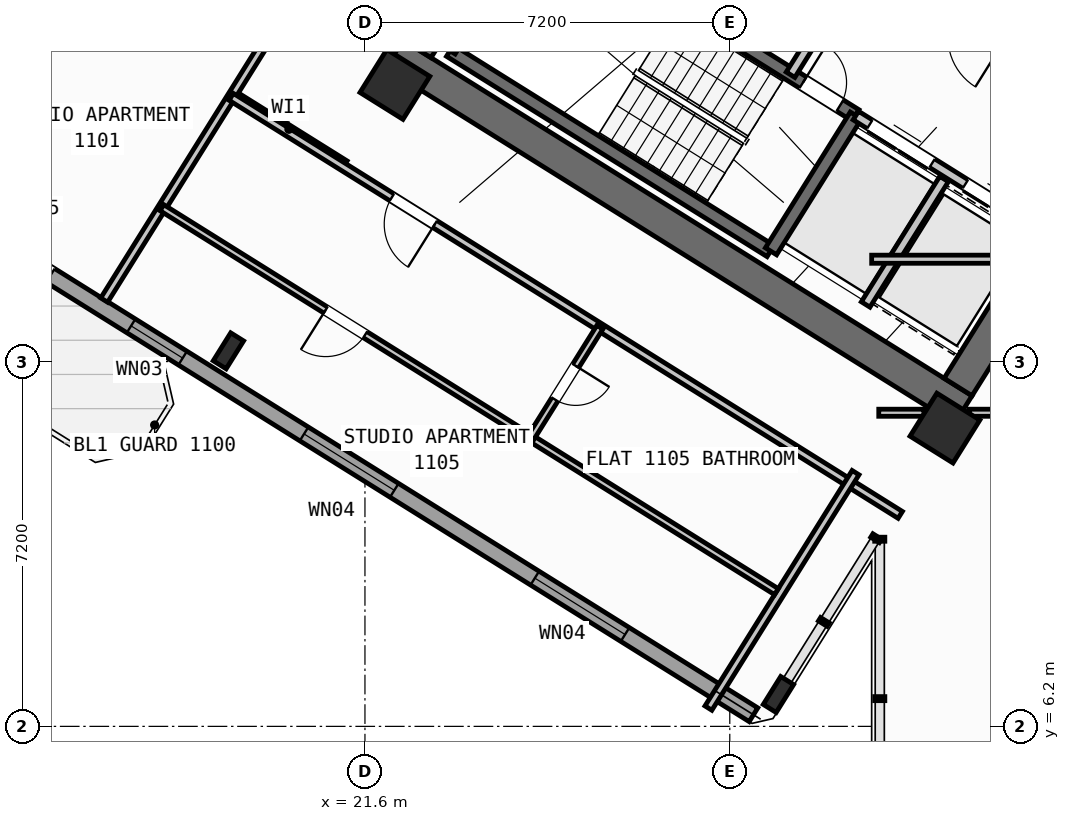
"""IFC4 building model, lengths in metres.
Left out: names, types, materials, properties, quantities, classifications, styles, units other than length and angle.
Written with IfcOpenShell. Run it as: python <this file> out.ifc"""

import sys

from ifc_helpers import new_model, si_unit, direction, frame, frame_2d, origin, origin_2d, place, context, subcontext, project, spatial, rectangle, hollow_rectangle, i_section, extrude, source, transform, mapped, element, fill, save


model = new_model("IFC4")
c1 = context("Model", 3, precision=1e-05, world=origin(), true_north=direction((0.0, 1.0)))
c2 = subcontext(c1, "Body", "Model", "MODEL_VIEW")
j1 = project(units=[si_unit("LENGTHUNIT", "METRE"), si_unit("PLANEANGLEUNIT", "RADIAN")], contexts=[c1])
p1 = place(None, origin())
s1 = spatial("IfcSite", under=j1, at=p1, CompositionType="ELEMENT")
p2 = place(p1, origin())
s2 = spatial("IfcBuilding", under=s1, at=p2, CompositionType="ELEMENT")
p3 = place(p2, frame((0.0, 0.0, 45.6)))
s3 = spatial("IfcBuildingStorey", under=s2, at=p3, CompositionType="ELEMENT", Elevation=45.6)
p4 = place(p3, frame((33.409, 12.45, 0.0), z_axis=(0.0, 0.0, 1.0), x_axis=(-0.848051132073, 0.529914405721, 0.0)))
e1 = element("IfcWall", 1, at=p4, inside=s3, PredefinedType="SHEAR", context=c2, shape_type="SweptSolid", body=[
    extrude(rectangle(XDim=13.24, YDim=0.65, at=frame_2d((6.62, 0.0))), origin(), (0.0, 0.0, 1.0), 3.35),
])
p5 = place(p3, frame((36.683, 18.304, 0.0), z_axis=(0.0, 0.0, 1.0), x_axis=(-0.529899109053, -0.848060690178, 0.0)))
e2 = element("IfcWall", 2, at=p5, inside=s3, PredefinedType="SHEAR", context=c2, shape_type="SweptSolid", body=[
    extrude(rectangle(XDim=6.375, YDim=0.65, at=frame_2d((3.188, 0.0))), origin(), (0.0, 0.0, 1.0), 3.35),
])
p6 = place(p3, frame((26.007, 24.976, 0.0), z_axis=(0.0, 0.0, 1.0), x_axis=(-0.529916319127, -0.848049936456, 0.0)))
e3 = element("IfcWall", 3, at=p6, inside=s3, PredefinedType="SHEAR", context=c2, shape_type="SweptSolid", body=[
    extrude(rectangle(XDim=6.375, YDim=0.65, at=frame_2d((3.188, 0.0))), origin(), (0.0, 0.0, 1.0), 3.35),
])
m1 = source(origin(), c2, "Body", "SweptSolid", [
    extrude(hollow_rectangle(XDim=1.0, YDim=1.0, WallThickness=0.04, at=origin_2d()), origin(), (0.0, 0.0, 1.0), 3.6),
])
p7 = place(p3, frame((33.046, 12.087, 0.0), z_axis=(0.0, 0.0, 1.0), x_axis=(-0.848048096156, 0.529919264233, 0.0)))
e4 = element("IfcColumn", 4, at=p7, inside=s3, PredefinedType="COLUMN", context=c2, shape_type="MappedRepresentation", body=[
    mapped(m1, transform((0.0, 0.0, 0.0), scale=1.0)),
])
m2 = source(origin(), c2, "Body", "SweptSolid", [
    extrude(i_section(OverallWidth=0.3, OverallDepth=0.65, WebThickness=0.016, FlangeThickness=0.031, at=origin_2d()), origin(), (0.0, 0.0, 1.0), 3.6),
])
p8 = place(p3, frame((29.761, 6.829, 0.0), z_axis=(0.0, 0.0, 1.0), x_axis=(-0.848048096156, 0.529919264233, 0.0)))
e5 = element("IfcColumn", 5, at=p8, inside=s3, PredefinedType="COLUMN", context=c2, shape_type="MappedRepresentation", body=[
    mapped(m2, transform((0.0, 0.0, 0.0), scale=1.0)),
])
p9 = place(p3, frame((22.191, 18.87, 0.0), z_axis=(0.0, 0.0, 1.0), x_axis=(-0.848048096156, 0.529919264233, 0.0)))
e6 = element("IfcColumn", 6, at=p9, inside=s3, PredefinedType="COLUMN", context=c2, shape_type="MappedRepresentation", body=[
    mapped(m1, transform((0.0, 0.0, 0.0), scale=1.0)),
])
p10 = place(p3, frame((18.906, 13.612, 0.0), z_axis=(0.0, 0.0, 1.0), x_axis=(-0.848048096156, 0.529919264233, 0.0)))
e7 = element("IfcColumn", 7, at=p10, inside=s3, PredefinedType="COLUMN", context=c2, shape_type="MappedRepresentation", body=[
    mapped(m2, transform((0.0, 0.0, 0.0), scale=1.0)),
])
p11 = place(p3, frame((29.268, 6.429, 0.0), z_axis=(0.0, 0.0, 1.0), x_axis=(-0.848049971435, 0.529916263149, 0.0)))
e8 = element("IfcWall", 8, at=p11, inside=s3, PredefinedType="STANDARD", context=c2, shape_type="SweptSolid", body=[
    extrude(rectangle(XDim=31.588, YDim=0.32, at=frame_2d((15.794, 0.0))), origin(), (0.0, 0.0, 1.0), 3.35),
])
p12 = place(p11, frame((16.362, 0.0, 0.0)))
e9 = element("IfcOpeningElement", 9, at=p12, cuts=e8, PredefinedType="OPENING", context=c2, shape_type="SweptSolid", body=[
    extrude(rectangle(XDim=1.2, YDim=2.15, at=frame_2d((0.6, 1.075))), frame((0.0, 0.17, 0.0), z_axis=(0.0, -1.0, 0.0), x_axis=(1.0, 0.0, 0.0)), (0.0, 0.0, 1.0), 0.34),
])
p13 = place(p11, frame((2.989, 0.0, 0.8)))
e10 = element("IfcOpeningElement", 10, at=p13, cuts=e8, PredefinedType="OPENING", context=c2, shape_type="SweptSolid", body=[
    extrude(rectangle(XDim=2.1, YDim=1.55, at=frame_2d((1.05, 0.775))), frame((0.0, 0.17, 0.0), z_axis=(0.0, -1.0, 0.0), x_axis=(1.0, 0.0, 0.0)), (0.0, 0.0, 1.0), 0.34),
])
p14 = place(p11, frame((8.359, 0.0, 0.8)))
e11 = element("IfcOpeningElement", 11, at=p14, cuts=e8, PredefinedType="OPENING", context=c2, shape_type="SweptSolid", body=[
    extrude(rectangle(XDim=2.1, YDim=1.55, at=frame_2d((1.05, 0.775))), frame((0.0, 0.17, 0.0), z_axis=(0.0, -1.0, 0.0), x_axis=(1.0, 0.0, 0.0)), (0.0, 0.0, 1.0), 0.34),
])
p15 = place(p11, frame((13.284, 0.0, 0.95)))
e12 = element("IfcOpeningElement", 12, at=p15, cuts=e8, PredefinedType="OPENING", context=c2, shape_type="SweptSolid", body=[
    extrude(rectangle(XDim=1.2, YDim=1.4, at=frame_2d((0.6, 0.7))), frame((0.0, 0.17, 0.0), z_axis=(0.0, -1.0, 0.0), x_axis=(1.0, 0.0, 0.0)), (0.0, 0.0, 1.0), 0.34),
])
p16 = place(p11, frame((20.259, 0.0, 0.95)))
e13 = element("IfcOpeningElement", 13, at=p16, cuts=e8, PredefinedType="OPENING", context=c2, shape_type="SweptSolid", body=[
    extrude(rectangle(XDim=1.2, YDim=1.4, at=frame_2d((0.6, 0.7))), frame((0.0, 0.17, 0.0), z_axis=(0.0, -1.0, 0.0), x_axis=(1.0, 0.0, 0.0)), (0.0, 0.0, 1.0), 0.34),
])
p17 = place(p11, frame((22.929, 0.0, 0.95)))
e14 = element("IfcOpeningElement", 14, at=p17, cuts=e8, PredefinedType="OPENING", context=c2, shape_type="SweptSolid", body=[
    extrude(rectangle(XDim=1.2, YDim=1.4, at=frame_2d((0.6, 0.7))), frame((0.0, 0.17, 0.0), z_axis=(0.0, -1.0, 0.0), x_axis=(1.0, 0.0, 0.0)), (0.0, 0.0, 1.0), 0.34),
])
p18 = place(p11, frame((26.106, 0.0, 0.85)))
e15 = element("IfcOpeningElement", 15, at=p18, cuts=e8, PredefinedType="OPENING", context=c2, shape_type="SweptSolid", body=[
    extrude(rectangle(XDim=1.5, YDim=1.5, at=frame_2d((0.75, 0.75))), frame((0.0, 0.17, 0.0), z_axis=(0.0, -1.0, 0.0), x_axis=(1.0, 0.0, 0.0)), (0.0, 0.0, 1.0), 0.34),
])
p19 = place(p11, frame((29.068, 0.0, 0.85)))
e16 = element("IfcOpeningElement", 16, at=p19, cuts=e8, PredefinedType="OPENING", context=c2, shape_type="SweptSolid", body=[
    extrude(rectangle(XDim=1.8, YDim=1.5, at=frame_2d((0.9, 0.75))), frame((0.0, 0.17, 0.0), z_axis=(0.0, -1.0, 0.0), x_axis=(1.0, 0.0, 0.0)), (0.0, 0.0, 1.0), 0.34),
])
p20 = place(p3, frame((29.605, 15.581, 0.0), z_axis=(0.0, 0.0, 1.0), x_axis=(-0.848036911448, 0.529937163087, 0.0)))
e17 = element("IfcWall", 17, at=p20, inside=s3, PredefinedType="SHEAR", context=c2, shape_type="SweptSolid", body=[
    extrude(rectangle(XDim=7.46, YDim=0.26, at=frame_2d((3.73, 0.0))), origin(), (0.0, 0.0, 1.0), 3.35),
])
p21 = place(p3, frame((31.28, 18.261, 0.0), z_axis=(0.0, 0.0, 1.0), x_axis=(-0.848051618787, 0.529913626805, 0.0)))
e18 = element("IfcWall", 18, at=p21, inside=s3, PredefinedType="SHEAR", context=c2, shape_type="SweptSolid", body=[
    extrude(rectangle(XDim=7.46, YDim=0.26, at=frame_2d((3.73, 0.0))), origin(), (0.0, 0.0, 1.0), 3.35),
])
p22 = place(p21, frame((0.36, 0.0, 0.0)))
e19 = element("IfcOpeningElement", 19, at=p22, cuts=e18, PredefinedType="OPENING", context=c2, shape_type="SweptSolid", body=[
    extrude(rectangle(XDim=0.86, YDim=2.05, at=frame_2d((0.43, 1.025))), frame((0.0, 0.14, 0.0), z_axis=(0.0, -1.0, 0.0), x_axis=(1.0, 0.0, 0.0)), (0.0, 0.0, 1.0), 0.28),
])
p23 = place(p3, frame((31.288, 18.256, 0.0), z_axis=(0.0, 0.0, 1.0), x_axis=(-0.529943379326, -0.848033026897, 0.0)))
e20 = element("IfcWall", 20, at=p23, inside=s3, PredefinedType="SHEAR", context=c2, shape_type="SweptSolid", body=[
    extrude(rectangle(XDim=3.16, YDim=0.26, at=frame_2d((1.58, 0.0))), origin(), (0.0, 0.0, 1.0), 3.35),
])
p24 = place(p3, frame((24.945, 22.22, 0.0), z_axis=(0.0, 0.0, 1.0), x_axis=(-0.529908658664, -0.84805472316, 0.0)))
e21 = element("IfcWall", 21, at=p24, inside=s3, PredefinedType="SHEAR", context=c2, shape_type="SweptSolid", body=[
    extrude(rectangle(XDim=3.16, YDim=0.26, at=frame_2d((1.58, 0.0))), origin(), (0.0, 0.0, 1.0), 3.35),
])
p25 = place(p3, frame((34.848, 16.031, 0.0), z_axis=(0.0, 0.0, 1.0), x_axis=(-0.848044042236, 0.529925751807, 0.0)))
e22 = element("IfcWall", 22, at=p25, inside=s3, PredefinedType="STANDARD", context=c2, shape_type="SweptSolid", body=[
    extrude(rectangle(XDim=4.198, YDim=0.2, at=frame_2d((2.099, 0.0))), origin(), (0.0, 0.0, 1.0), 3.34),
])
p26 = place(p25, frame((0.348, 0.0, 0.0)))
e23 = element("IfcOpeningElement", 23, at=p26, cuts=e22, PredefinedType="OPENING", context=c2, shape_type="SweptSolid", body=[
    extrude(rectangle(XDim=1.3, YDim=2.2, at=frame_2d((0.65, 1.1))), frame((0.0, 0.11, 0.0), z_axis=(0.0, -1.0, 0.0), x_axis=(1.0, 0.0, 0.0)), (0.0, 0.0, 1.0), 0.22),
])
p27 = place(p25, frame((2.423, 0.0, 0.0)))
e24 = element("IfcOpeningElement", 24, at=p27, cuts=e22, PredefinedType="OPENING", context=c2, shape_type="SweptSolid", body=[
    extrude(rectangle(XDim=1.45, YDim=2.25, at=frame_2d((0.725, 1.125))), frame((0.0, 0.11, 0.0), z_axis=(0.0, -1.0, 0.0), x_axis=(1.0, 0.0, 0.0)), (0.0, 0.0, 1.0), 0.22),
])
p28 = place(p3, frame((36.374, 18.474, 0.0), z_axis=(0.0, 0.0, 1.0), x_axis=(-0.848051071577, 0.529914502535, 0.0)))
e25 = element("IfcWall", 25, at=p28, inside=s3, PredefinedType="STANDARD", context=c2, shape_type="SweptSolid", body=[
    extrude(rectangle(XDim=5.718, YDim=0.2, at=frame_2d((2.859, 0.0))), origin(), (0.0, 0.0, 1.0), 3.34),
])
p29 = place(p28, frame((2.498, 0.0, 0.0)))
e26 = element("IfcOpeningElement", 26, at=p29, cuts=e25, PredefinedType="OPENING", context=c2, shape_type="SweptSolid", body=[
    extrude(rectangle(XDim=1.15, YDim=2.1, at=frame_2d((0.575, 1.05))), frame((0.0, 0.11, 0.0), z_axis=(0.0, -1.0, 0.0), x_axis=(1.0, 0.0, 0.0)), (0.0, 0.0, 1.0), 0.22),
])
p30 = place(p3, frame((33.029, 17.003, 0.0), z_axis=(0.0, 0.0, 1.0), x_axis=(-0.529916267533, -0.848049968695, 0.0)))
e27 = element("IfcWall", 27, at=p30, inside=s3, PredefinedType="STANDARD", context=c2, shape_type="SweptSolid", body=[
    extrude(rectangle(XDim=2.92, YDim=0.2, at=frame_2d((1.46, 0.0))), origin(), (0.0, 0.0, 1.0), 3.34),
])
p31 = place(p3, frame((31.525, 21.504, 0.0), z_axis=(0.0, 0.0, 1.0), x_axis=(-0.529907497854, -0.848055448493, 0.0)))
e28 = element("IfcWall", 28, at=p31, inside=s3, PredefinedType="STANDARD", context=c2, shape_type="SweptSolid", body=[
    extrude(rectangle(XDim=2.88, YDim=0.2, at=frame_2d((1.44, 0.0))), origin(), (0.0, 0.0, 1.0), 3.34),
])
p32 = place(p3, frame((21.206, 17.292, 0.0), z_axis=(0.0, 0.0, 1.0), x_axis=(-0.848050851465, 0.529914854792, 0.0)))
e29 = element("IfcWall", 29, at=p32, inside=s3, PredefinedType="PARTITIONING", context=c2, shape_type="SweptSolid", body=[
    extrude(rectangle(XDim=2.61, YDim=0.16, at=frame_2d((1.305, 0.0))), origin(), (0.0, 0.0, 1.0), 3.34),
])
p33 = place(p3, frame((21.938, 23.391, 0.0), z_axis=(0.0, 0.0, 1.0), x_axis=(-0.529924725692, -0.848044683434, 0.0)))
e30 = element("IfcWall", 30, at=p33, inside=s3, PredefinedType="PARTITIONING", context=c2, shape_type="SweptSolid", body=[
    extrude(rectangle(XDim=10.35, YDim=0.16, at=frame_2d((5.175, 0.0))), origin(), (0.0, 0.0, 1.0), 3.34),
])
p34 = place(p3, frame((16.492, 21.827, 0.0), z_axis=(0.0, 0.0, 1.0), x_axis=(-0.529904608059, -0.848057254175, 0.0)))
e31 = element("IfcWall", 31, at=p34, inside=s3, PredefinedType="PARTITIONING", context=c2, shape_type="SweptSolid", body=[
    extrude(rectangle(XDim=5.351, YDim=0.16, at=frame_2d((2.675, 0.0))), origin(), (0.0, 0.0, 1.0), 2.725),
])
p35 = place(p3, frame((32.164, 10.374, 0.0), z_axis=(0.0, 0.0, 1.0), x_axis=(-0.848044107957, 0.529925646633, 0.0)))
e32 = element("IfcWall", 32, at=p35, inside=s3, PredefinedType="PARTITIONING", context=c2, shape_type="SweptSolid", body=[
    extrude(rectangle(XDim=15.57, YDim=0.16, at=frame_2d((7.785, 0.0))), origin(), (0.0, 0.0, 1.0), 3.34),
])
p36 = place(p35, frame((10.83, 0.0, 0.0)))
e33 = element("IfcOpeningElement", 33, at=p36, cuts=e32, PredefinedType="OPENING", context=c2, shape_type="SweptSolid", body=[
    extrude(rectangle(XDim=1.0, YDim=2.1, at=frame_2d((0.5, 1.05))), frame((0.0, 0.09, 0.0), z_axis=(0.0, -1.0, 0.0), x_axis=(1.0, 0.0, 0.0)), (0.0, 0.0, 1.0), 0.18),
])
p37 = place(p3, frame((31.282, 11.208, 0.0), z_axis=(0.0, 0.0, 1.0), x_axis=(-0.529938869374, -0.84803584519, 0.0)))
e34 = element("IfcWall", 34, at=p37, inside=s3, PredefinedType="PARTITIONING", context=c2, shape_type="SweptSolid", body=[
    extrude(rectangle(XDim=5.48, YDim=0.16, at=frame_2d((2.74, 0.0))), origin(), (0.0, 0.0, 1.0), 3.34),
])
p38 = place(p3, frame((29.72, 8.859, 0.0), z_axis=(0.0, 0.0, 1.0), x_axis=(-0.848049134363, 0.529917602752, 0.0)))
e35 = element("IfcWall", 35, at=p38, inside=s3, PredefinedType="PLUMBINGWALL", context=c2, shape_type="SweptSolid", body=[
    extrude(rectangle(XDim=14.3, YDim=0.14, at=frame_2d((7.15, 0.0))), origin(), (0.0, 0.0, 1.0), 3.34),
])
p39 = place(p38, frame((9.57, 0.0, 0.0)))
e36 = element("IfcOpeningElement", 36, at=p39, cuts=e35, PredefinedType="OPENING", context=c2, shape_type="SweptSolid", body=[
    extrude(rectangle(XDim=0.92, YDim=2.08, at=frame_2d((0.46, 1.04))), frame((0.0, 0.08, 0.0), z_axis=(0.0, -1.0, 0.0), x_axis=(1.0, 0.0, 0.0)), (0.0, 0.0, 1.0), 0.16),
])
p40 = place(p3, frame((26.237, 14.078, 0.0), z_axis=(0.0, 0.0, 1.0), x_axis=(-0.52995640672, -0.848024885824, 0.0)))
e37 = element("IfcWall", 37, at=p40, inside=s3, PredefinedType="PLUMBINGWALL", context=c2, shape_type="SweptSolid", body=[
    extrude(rectangle(XDim=2.58, YDim=0.14, at=frame_2d((1.29, 0.0))), origin(), (0.0, 0.0, 1.0), 3.34),
])
p41 = place(p40, frame((0.9, 0.0, 0.0)))
e38 = element("IfcOpeningElement", 38, at=p41, cuts=e37, PredefinedType="OPENING", context=c2, shape_type="SweptSolid", body=[
    extrude(rectangle(XDim=0.78, YDim=2.05, at=frame_2d((0.39, 1.025))), frame((0.0, 0.08, 0.0), z_axis=(0.0, -1.0, 0.0), x_axis=(1.0, 0.0, 0.0)), (0.0, 0.0, 1.0), 0.16),
])
p42 = place(p3, frame((31.6, 15.42, 0.0), z_axis=(0.0, 0.0, 1.0), x_axis=(1.0, 0.0, 0.0)))
e39 = element("IfcWall", 39, at=p42, inside=s3, PredefinedType="PARTITIONING", context=c2, shape_type="SweptSolid", body=[
    extrude(rectangle(XDim=2.866, YDim=0.16, at=frame_2d((1.433, 0.0))), origin(), (0.0, 0.0, 1.0), 3.34),
])
p43 = place(p3, frame((31.74, 12.39, 0.0), z_axis=(0.0, 0.0, 1.0), x_axis=(1.0, 0.0, 0.0)))
e40 = element("IfcWall", 40, at=p43, inside=s3, PredefinedType="PLUMBINGWALL", context=c2, shape_type="SweptSolid", body=[
    extrude(rectangle(XDim=0.892, YDim=0.14, at=frame_2d((0.446, 0.0))), origin(), (0.0, 0.0, 1.0), 3.34),
])
p44 = place(p3, frame((33.527, 12.39, 0.0), z_axis=(0.0, 0.0, 1.0), x_axis=(1.0, 0.0, 0.0)))
e41 = element("IfcWall", 41, at=p44, inside=s3, PredefinedType="PLUMBINGWALL", context=c2, shape_type="SweptSolid", body=[
    extrude(rectangle(XDim=3.695, YDim=0.14, at=frame_2d((1.847, 0.0))), origin(), (0.0, 0.0, 1.0), 2.525),
])
p45 = place(p44, frame((0.674, 0.0, 0.0)))
e42 = element("IfcOpeningElement", 42, at=p45, cuts=e41, PredefinedType="OPENING", context=c2, shape_type="SweptSolid", body=[
    extrude(rectangle(XDim=0.92, YDim=2.08, at=frame_2d((0.46, 1.04))), frame((0.0, 0.08, 0.0), z_axis=(0.0, -1.0, 0.0), x_axis=(1.0, 0.0, 0.0)), (0.0, 0.0, 1.0), 0.16),
])
m3 = source(origin(), c2, "Body", "SweptSolid", [
    extrude(rectangle(XDim=2.1, YDim=1.55, at=frame_2d((1.05, 0.775))), frame((0.0, 0.03, 0.0), z_axis=(0.0, -1.0, 0.0), x_axis=(1.0, 0.0, 0.0)), (0.0, 0.0, 1.0), 0.06),
])
p46 = place(p13, origin())
e43 = element("IfcWindow", 43, at=p46, inside=s3, PartitioningType="SINGLE_PANEL", PredefinedType="WINDOW", context=c2, shape_type="MappedRepresentation", body=[
    mapped(m3, transform((0.0, 0.0, 0.0), scale=1.0)),
])
fill(e10, e43)
p47 = place(p14, origin())
e44 = element("IfcWindow", 44, at=p47, inside=s3, PartitioningType="SINGLE_PANEL", PredefinedType="WINDOW", context=c2, shape_type="MappedRepresentation", body=[
    mapped(m3, transform((0.0, 0.0, 0.0), scale=1.0)),
])
fill(e11, e44)
m4 = source(origin(), c2, "Body", "SweptSolid", [
    extrude(rectangle(XDim=1.2, YDim=1.4, at=frame_2d((0.6, 0.7))), frame((0.0, 0.03, 0.0), z_axis=(0.0, -1.0, 0.0), x_axis=(1.0, 0.0, 0.0)), (0.0, 0.0, 1.0), 0.06),
])
p48 = place(p15, origin())
e45 = element("IfcWindow", 45, at=p48, inside=s3, PartitioningType="SINGLE_PANEL", PredefinedType="WINDOW", context=c2, shape_type="MappedRepresentation", body=[
    mapped(m4, transform((0.0, 0.0, 0.0), scale=1.0)),
])
fill(e12, e45)
m5 = source(origin(), c2, "Body", "SweptSolid", [
    extrude(rectangle(XDim=0.86, YDim=2.05, at=frame_2d((0.43, 1.025))), frame((0.0, 0.025, 0.0), z_axis=(0.0, -1.0, 0.0), x_axis=(1.0, 0.0, 0.0)), (0.0, 0.0, 1.0), 0.05),
])
p49 = place(p22, frame((0.86, 0.0, 0.0), z_axis=(0.0, 0.0, 1.0), x_axis=(-1.0, 0.0, 0.0)))
e46 = element("IfcDoor", 46, at=p49, inside=s3, OperationType="SINGLE_SWING_LEFT", PredefinedType="DOOR", context=c2, shape_type="MappedRepresentation", body=[
    mapped(m5, transform((0.0, 0.0, 0.0), scale=1.0)),
])
fill(e19, e46)
m6 = source(origin(), c2, "Body", "SweptSolid", [
    extrude(rectangle(XDim=1.3, YDim=2.2, at=frame_2d((0.65, 1.1))), frame((0.0, 0.025, 0.0), z_axis=(0.0, -1.0, 0.0), x_axis=(1.0, 0.0, 0.0)), (0.0, 0.0, 1.0), 0.05),
])
p50 = place(p26, origin())
e47 = element("IfcDoor", 47, at=p50, inside=s3, OperationType="DOUBLE_DOOR_SLIDING", PredefinedType="DOOR", context=c2, shape_type="MappedRepresentation", body=[
    mapped(m6, transform((0.0, 0.0, 0.0), scale=1.0)),
])
fill(e23, e47)
m7 = source(origin(), c2, "Body", "SweptSolid", [
    extrude(rectangle(XDim=1.45, YDim=2.25, at=frame_2d((0.725, 1.125))), frame((0.0, 0.025, 0.0), z_axis=(0.0, -1.0, 0.0), x_axis=(1.0, 0.0, 0.0)), (0.0, 0.0, 1.0), 0.05),
])
p51 = place(p27, origin())
e48 = element("IfcDoor", 48, at=p51, inside=s3, OperationType="DOUBLE_DOOR_SLIDING", PredefinedType="DOOR", context=c2, shape_type="MappedRepresentation", body=[
    mapped(m7, transform((0.0, 0.0, 0.0), scale=1.0)),
])
fill(e24, e48)
m8 = source(origin(), c2, "Body", "SweptSolid", [
    extrude(rectangle(XDim=1.0, YDim=2.1, at=frame_2d((0.5, 1.05))), frame((0.0, 0.025, 0.0), z_axis=(0.0, -1.0, 0.0), x_axis=(1.0, 0.0, 0.0)), (0.0, 0.0, 1.0), 0.05),
])
p52 = place(p36, origin())
e49 = element("IfcDoor", 49, at=p52, inside=s3, OperationType="SINGLE_SWING_LEFT", PredefinedType="DOOR", context=c2, shape_type="MappedRepresentation", body=[
    mapped(m8, transform((0.0, 0.0, 0.0), scale=1.0)),
])
fill(e33, e49)
m9 = source(origin(), c2, "Body", "SweptSolid", [
    extrude(rectangle(XDim=0.92, YDim=2.08, at=frame_2d((0.46, 1.04))), frame((0.0, 0.025, 0.0), z_axis=(0.0, -1.0, 0.0), x_axis=(1.0, 0.0, 0.0)), (0.0, 0.0, 1.0), 0.05),
])
p53 = place(p39, origin())
e50 = element("IfcDoor", 50, at=p53, inside=s3, OperationType="SINGLE_SWING_RIGHT", PredefinedType="DOOR", context=c2, shape_type="MappedRepresentation", body=[
    mapped(m9, transform((0.0, 0.0, 0.0), scale=1.0)),
])
fill(e36, e50)
m10 = source(origin(), c2, "Body", "SweptSolid", [
    extrude(rectangle(XDim=0.78, YDim=2.05, at=frame_2d((0.39, 1.025))), frame((0.0, 0.025, 0.0), z_axis=(0.0, -1.0, 0.0), x_axis=(1.0, 0.0, 0.0)), (0.0, 0.0, 1.0), 0.05),
])
p54 = place(p41, origin())
e51 = element("IfcDoor", 51, at=p54, inside=s3, OperationType="SINGLE_SWING_LEFT", PredefinedType="DOOR", context=c2, shape_type="MappedRepresentation", body=[
    mapped(m10, transform((0.0, 0.0, 0.0), scale=1.0)),
])
fill(e38, e51)
save(model, sys.argv[1])
